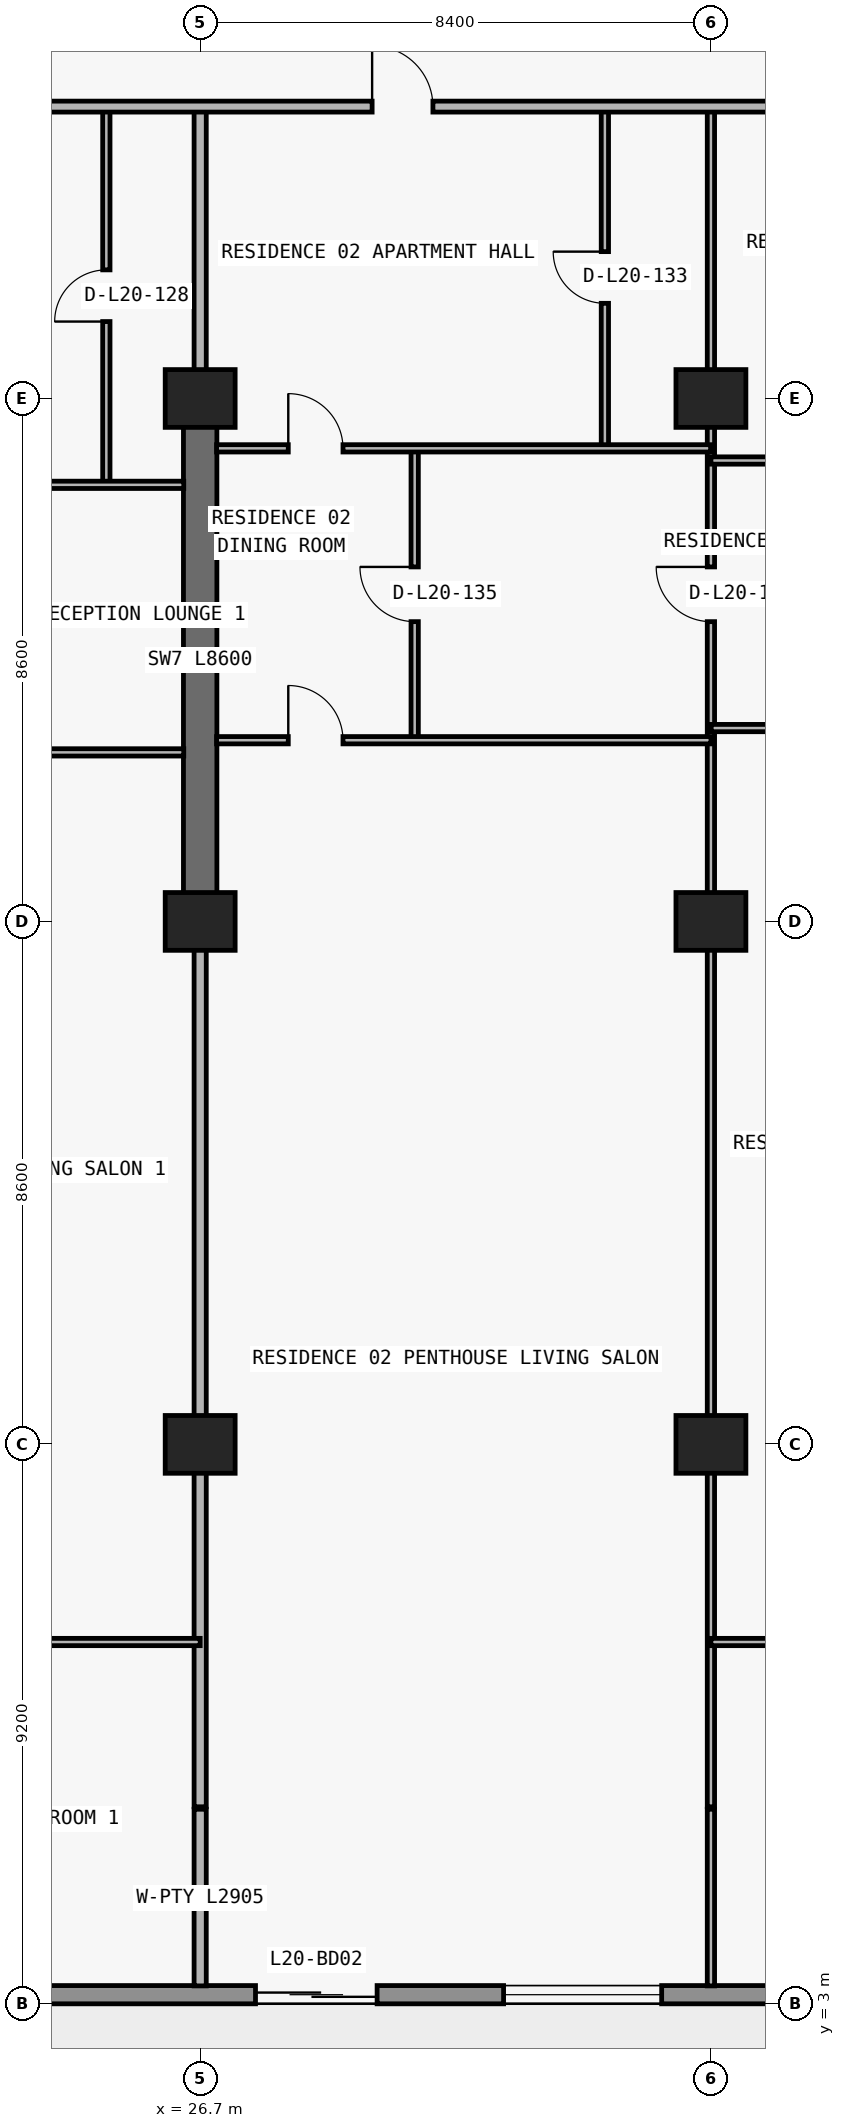
"""IFC4 building model, lengths in metres.
Left out: names, types, materials, properties, quantities, classifications, styles, units other than length and angle.
Written with IfcOpenShell. Run it as: python <this file> out.ifc"""

import sys

from ifc_helpers import new_model, si_unit, direction, frame, frame_2d, origin, origin_2d, place, context, subcontext, project, spatial, rectangle, extrude, element, fill, save


model = new_model("IFC4")
c1 = context("Model", 3, precision=1e-05, world=origin(), true_north=direction((0.0, 1.0)))
c2 = subcontext(c1, "Body", "Model", "MODEL_VIEW")
j1 = project(units=[si_unit("LENGTHUNIT", "METRE"), si_unit("PLANEANGLEUNIT", "RADIAN")], contexts=[c1])
p1 = place(None, origin())
s1 = spatial("IfcSite", under=j1, at=p1, CompositionType="ELEMENT")
p2 = place(p1, origin())
s2 = spatial("IfcBuilding", under=s1, at=p2, CompositionType="ELEMENT")
p3 = place(p2, frame((0.0, 0.0, 76.2)))
s3 = spatial("IfcBuildingStorey", under=s2, at=p3, CompositionType="ELEMENT", Elevation=76.2)
for number, where, z_axis, x_axis in (
    (1, (26.7, 12.2, 0.0), (0.0, 0.0, 1.0), (1.0, 0.0, 0.0)),
    (2, (35.1, 12.2, 0.0), (0.0, 0.0, 1.0), (1.0, 0.0, 0.0)),
    (3, (26.7, 20.8, 0.0), (0.0, 0.0, 1.0), (1.0, 0.0, 0.0)),
    (4, (35.1, 20.8, 0.0), (0.0, 0.0, 1.0), (1.0, 0.0, 0.0)),
    (5, (26.7, 29.4, 0.0), (0.0, 0.0, 1.0), (1.0, 0.0, 0.0)),
    (6, (35.1, 29.4, 0.0), (0.0, 0.0, 1.0), (1.0, 0.0, 0.0)),
):
    element("IfcColumn", number, at=place(p3, frame(where, z_axis=z_axis, x_axis=x_axis)), inside=s3, PredefinedType="COLUMN", context=c2, shape_type="SweptSolid", body=[
        extrude(rectangle(XDim=1.15, YDim=0.95, at=origin_2d()), origin(), (0.0, 0.0, 1.0), 3.0),
    ])
p4 = place(p3, frame((26.7, 20.8, 0.0), z_axis=(0.0, 0.0, 1.0), x_axis=(0.0, 1.0, 0.0)))
e7 = element("IfcWall", 7, at=p4, inside=s3, PredefinedType="SHEAR", context=c2, shape_type="SweptSolid", body=[
    extrude(rectangle(XDim=8.6, YDim=0.55, at=frame_2d((4.3, 0.0))), origin(), (0.0, 0.0, 1.0), 3.0),
])
p5 = place(p3, frame((72.7, 3.15, 0.0), z_axis=(0.0, 0.0, 1.0), x_axis=(-1.0, 0.0, 0.0)))
e8 = element("IfcWall", 8, at=p5, inside=s3, PredefinedType="STANDARD", context=c2, shape_type="SweptSolid", body=[
    extrude(rectangle(XDim=67.6, YDim=0.3, at=frame_2d((33.8, 0.0))), origin(), (0.0, 0.0, 1.0), 3.0),
])
p6 = place(p5, frame((59.89, 0.0, 0.0)))
e9 = element("IfcOpeningElement", 9, at=p6, cuts=e8, PredefinedType="OPENING", context=c2, shape_type="SweptSolid", body=[
    extrude(rectangle(XDim=2.0, YDim=2.3, at=frame_2d((1.0, 1.15))), frame((0.0, 0.16, 0.0), z_axis=(0.0, -1.0, 0.0), x_axis=(1.0, 0.0, 0.0)), (0.0, 0.0, 1.0), 0.32),
])
p7 = place(p5, frame((55.21, 0.0, 0.65)))
e10 = element("IfcOpeningElement", 10, at=p7, cuts=e8, PredefinedType="OPENING", context=c2, shape_type="SweptSolid", body=[
    extrude(rectangle(XDim=2.6, YDim=1.85, at=frame_2d((1.3, 0.925))), frame((0.0, 0.16, 0.0), z_axis=(0.0, -1.0, 0.0), x_axis=(1.0, 0.0, 0.0)), (0.0, 0.0, 1.0), 0.32),
])
p8 = place(p5, frame((49.1, 0.0, 0.85)))
e11 = element("IfcOpeningElement", 11, at=p8, cuts=e8, PredefinedType="OPENING", context=c2, shape_type="SweptSolid", body=[
    extrude(rectangle(XDim=2.2, YDim=1.55, at=frame_2d((1.1, 0.775))), frame((0.0, 0.16, 0.0), z_axis=(0.0, -1.0, 0.0), x_axis=(1.0, 0.0, 0.0)), (0.0, 0.0, 1.0), 0.32),
])
p9 = place(p5, frame((43.09, 0.0, 0.0)))
e12 = element("IfcOpeningElement", 12, at=p9, cuts=e8, PredefinedType="OPENING", context=c2, shape_type="SweptSolid", body=[
    extrude(rectangle(XDim=2.0, YDim=2.3, at=frame_2d((1.0, 1.15))), frame((0.0, 0.16, 0.0), z_axis=(0.0, -1.0, 0.0), x_axis=(1.0, 0.0, 0.0)), (0.0, 0.0, 1.0), 0.32),
])
p10 = place(p5, frame((38.41, 0.0, 0.65)))
e13 = element("IfcOpeningElement", 13, at=p10, cuts=e8, PredefinedType="OPENING", context=c2, shape_type="SweptSolid", body=[
    extrude(rectangle(XDim=2.6, YDim=1.85, at=frame_2d((1.3, 0.925))), frame((0.0, 0.16, 0.0), z_axis=(0.0, -1.0, 0.0), x_axis=(1.0, 0.0, 0.0)), (0.0, 0.0, 1.0), 0.32),
])
p11 = place(p5, frame((32.7, 0.0, 0.85)))
e14 = element("IfcOpeningElement", 14, at=p11, cuts=e8, PredefinedType="OPENING", context=c2, shape_type="SweptSolid", body=[
    extrude(rectangle(XDim=2.2, YDim=1.55, at=frame_2d((1.1, 0.775))), frame((0.0, 0.16, 0.0), z_axis=(0.0, -1.0, 0.0), x_axis=(1.0, 0.0, 0.0)), (0.0, 0.0, 1.0), 0.32),
])
p12 = place(p5, frame((24.7, 0.0, 0.85)))
e15 = element("IfcOpeningElement", 15, at=p12, cuts=e8, PredefinedType="OPENING", context=c2, shape_type="SweptSolid", body=[
    extrude(rectangle(XDim=2.2, YDim=1.55, at=frame_2d((1.1, 0.775))), frame((0.0, 0.16, 0.0), z_axis=(0.0, -1.0, 0.0), x_axis=(1.0, 0.0, 0.0)), (0.0, 0.0, 1.0), 0.32),
])
p13 = place(p5, frame((18.69, 0.0, 0.0)))
e16 = element("IfcOpeningElement", 16, at=p13, cuts=e8, PredefinedType="OPENING", context=c2, shape_type="SweptSolid", body=[
    extrude(rectangle(XDim=2.0, YDim=2.3, at=frame_2d((1.0, 1.15))), frame((0.0, 0.16, 0.0), z_axis=(0.0, -1.0, 0.0), x_axis=(1.0, 0.0, 0.0)), (0.0, 0.0, 1.0), 0.32),
])
p14 = place(p5, frame((14.01, 0.0, 0.65)))
e17 = element("IfcOpeningElement", 17, at=p14, cuts=e8, PredefinedType="OPENING", context=c2, shape_type="SweptSolid", body=[
    extrude(rectangle(XDim=2.6, YDim=1.85, at=frame_2d((1.3, 0.925))), frame((0.0, 0.16, 0.0), z_axis=(0.0, -1.0, 0.0), x_axis=(1.0, 0.0, 0.0)), (0.0, 0.0, 1.0), 0.32),
])
p15 = place(p5, frame((7.9, 0.0, 0.85)))
e18 = element("IfcOpeningElement", 18, at=p15, cuts=e8, PredefinedType="OPENING", context=c2, shape_type="SweptSolid", body=[
    extrude(rectangle(XDim=2.2, YDim=1.55, at=frame_2d((1.1, 0.775))), frame((0.0, 0.16, 0.0), z_axis=(0.0, -1.0, 0.0), x_axis=(1.0, 0.0, 0.0)), (0.0, 0.0, 1.0), 0.32),
])
p16 = place(p3, frame((25.157, 27.98, 0.0), z_axis=(0.0, 0.0, 1.0), x_axis=(0.0, 1.0, 0.0)))
e19 = element("IfcWall", 19, at=p16, inside=s3, PredefinedType="PARTITIONING", context=c2, shape_type="SweptSolid", body=[
    extrude(rectangle(XDim=6.22, YDim=0.12, at=frame_2d((3.11, 0.0))), origin(), (0.0, 0.0, 1.0), 3.0),
])
p17 = place(p16, frame((2.685, 0.0, 0.0)))
e20 = element("IfcOpeningElement", 20, at=p17, cuts=e19, PredefinedType="OPENING", context=c2, shape_type="SweptSolid", body=[
    extrude(rectangle(XDim=0.85, YDim=2.1, at=frame_2d((0.425, 1.05))), frame((0.0, 0.07, 0.0), z_axis=(0.0, -1.0, 0.0), x_axis=(1.0, 0.0, 0.0)), (0.0, 0.0, 1.0), 0.14),
])
p18 = place(p3, frame((26.7, 3.295, 0.0), z_axis=(0.0, 0.0, 1.0), x_axis=(0.0, 1.0, 0.0)))
e21 = element("IfcWall", 21, at=p18, inside=s3, PredefinedType="PARTITIONING", context=c2, shape_type="SweptSolid", body=[
    extrude(rectangle(XDim=2.905, YDim=0.2, at=frame_2d((1.453, 0.0))), origin(), (0.0, 0.0, 1.0), 3.0),
])
p19 = place(p3, frame((26.7, 6.24, 0.0), z_axis=(0.0, 0.0, 1.0), x_axis=(0.0, 1.0, 0.0)))
e22 = element("IfcWall", 22, at=p19, inside=s3, PredefinedType="PARTITIONING", context=c2, shape_type="SweptSolid", body=[
    extrude(rectangle(XDim=14.555, YDim=0.2, at=frame_2d((7.277, 0.0))), origin(), (0.0, 0.0, 1.0), 2.06),
])
p20 = place(p3, frame((26.7, 29.405, 0.0), z_axis=(0.0, 0.0, 1.0), x_axis=(0.0, 1.0, 0.0)))
e23 = element("IfcWall", 23, at=p20, inside=s3, PredefinedType="PARTITIONING", context=c2, shape_type="SweptSolid", body=[
    extrude(rectangle(XDim=4.795, YDim=0.2, at=frame_2d((2.397, 0.0))), origin(), (0.0, 0.0, 1.0), 2.285),
])
p21 = place(p3, frame((30.228, 23.78, 0.0), z_axis=(0.0, 0.0, 1.0), x_axis=(0.0, 1.0, 0.0)))
e24 = element("IfcWall", 24, at=p21, inside=s3, PredefinedType="PARTITIONING", context=c2, shape_type="SweptSolid", body=[
    extrude(rectangle(XDim=4.8, YDim=0.12, at=frame_2d((2.4, 0.0))), origin(), (0.0, 0.0, 1.0), 3.0),
])
p22 = place(p21, frame((1.95, 0.0, 0.0)))
e25 = element("IfcOpeningElement", 25, at=p22, cuts=e24, PredefinedType="OPENING", context=c2, shape_type="SweptSolid", body=[
    extrude(rectangle(XDim=0.9, YDim=2.15, at=frame_2d((0.45, 1.075))), frame((0.0, 0.07, 0.0), z_axis=(0.0, -1.0, 0.0), x_axis=(1.0, 0.0, 0.0)), (0.0, 0.0, 1.0), 0.14),
])
p23 = place(p3, frame((33.356, 28.58, 0.0), z_axis=(0.0, 0.0, 1.0), x_axis=(0.0, 1.0, 0.0)))
e26 = element("IfcWall", 26, at=p23, inside=s3, PredefinedType="PARTITIONING", context=c2, shape_type="SweptSolid", body=[
    extrude(rectangle(XDim=5.62, YDim=0.12, at=frame_2d((2.81, 0.0))), origin(), (0.0, 0.0, 1.0), 3.0),
])
p24 = place(p23, frame((2.385, 0.0, 0.0)))
e27 = element("IfcOpeningElement", 27, at=p24, cuts=e26, PredefinedType="OPENING", context=c2, shape_type="SweptSolid", body=[
    extrude(rectangle(XDim=0.85, YDim=2.1, at=frame_2d((0.425, 1.05))), frame((0.0, 0.07, 0.0), z_axis=(0.0, -1.0, 0.0), x_axis=(1.0, 0.0, 0.0)), (0.0, 0.0, 1.0), 0.14),
])
p25 = place(p3, frame((35.1, 3.295, 0.0), z_axis=(0.0, 0.0, 1.0), x_axis=(0.0, 1.0, 0.0)))
e28 = element("IfcWall", 28, at=p25, inside=s3, PredefinedType="PARTITIONING", context=c2, shape_type="SweptSolid", body=[
    extrude(rectangle(XDim=2.905, YDim=0.12, at=frame_2d((1.453, 0.0))), origin(), (0.0, 0.0, 1.0), 3.0),
])
p26 = place(p3, frame((35.1, 6.24, 0.0), z_axis=(0.0, 0.0, 1.0), x_axis=(0.0, 1.0, 0.0)))
e29 = element("IfcWall", 29, at=p26, inside=s3, PredefinedType="PARTITIONING", context=c2, shape_type="SweptSolid", body=[
    extrude(rectangle(XDim=27.96, YDim=0.12, at=frame_2d((13.98, 0.0))), origin(), (0.0, 0.0, 1.0), 2.06),
])
p27 = place(p26, frame((19.49, 0.0, 0.0)))
e30 = element("IfcOpeningElement", 30, at=p27, cuts=e29, PredefinedType="OPENING", context=c2, shape_type="SweptSolid", body=[
    extrude(rectangle(XDim=0.9, YDim=2.01, at=frame_2d((0.45, 1.005))), frame((0.0, 0.07, 0.0), z_axis=(0.0, -1.0, 0.0), x_axis=(1.0, 0.0, 0.0)), (0.0, 0.0, 1.0), 0.14),
])
p28 = place(p3, frame((18.3, 8.95, 0.0), z_axis=(0.0, 0.0, 1.0), x_axis=(1.0, 0.0, 0.0)))
e31 = element("IfcWall", 31, at=p28, inside=s3, PredefinedType="PARTITIONING", context=c2, shape_type="SweptSolid", body=[
    extrude(rectangle(XDim=8.4, YDim=0.12, at=frame_2d((4.2, 0.0))), origin(), (0.0, 0.0, 1.0), 3.0),
])
p29 = place(p28, frame((3.75, 0.0, 0.0)))
e32 = element("IfcOpeningElement", 32, at=p29, cuts=e31, PredefinedType="OPENING", context=c2, shape_type="SweptSolid", body=[
    extrude(rectangle(XDim=0.9, YDim=2.15, at=frame_2d((0.45, 1.075))), frame((0.0, 0.07, 0.0), z_axis=(0.0, -1.0, 0.0), x_axis=(1.0, 0.0, 0.0)), (0.0, 0.0, 1.0), 0.14),
])
p30 = place(p3, frame((35.1, 8.95, 0.0), z_axis=(0.0, 0.0, 1.0), x_axis=(1.0, 0.0, 0.0)))
e33 = element("IfcWall", 33, at=p30, inside=s3, PredefinedType="PARTITIONING", context=c2, shape_type="SweptSolid", body=[
    extrude(rectangle(XDim=16.0, YDim=0.12, at=frame_2d((8.0, 0.0))), origin(), (0.0, 0.0, 1.0), 3.0),
])
p31 = place(p30, frame((3.35, 0.0, 0.0)))
e34 = element("IfcOpeningElement", 34, at=p31, cuts=e33, PredefinedType="OPENING", context=c2, shape_type="SweptSolid", body=[
    extrude(rectangle(XDim=0.9, YDim=2.15, at=frame_2d((0.45, 1.075))), frame((0.0, 0.07, 0.0), z_axis=(0.0, -1.0, 0.0), x_axis=(1.0, 0.0, 0.0)), (0.0, 0.0, 1.0), 0.14),
])
p32 = place(p30, frame((11.35, 0.0, 0.0)))
e35 = element("IfcOpeningElement", 35, at=p32, cuts=e33, PredefinedType="OPENING", context=c2, shape_type="SweptSolid", body=[
    extrude(rectangle(XDim=0.9, YDim=2.15, at=frame_2d((0.45, 1.075))), frame((0.0, 0.07, 0.0), z_axis=(0.0, -1.0, 0.0), x_axis=(1.0, 0.0, 0.0)), (0.0, 0.0, 1.0), 0.14),
])
p33 = place(p3, frame((18.305, 23.58, 0.0), z_axis=(0.0, 0.0, 1.0), x_axis=(1.0, 0.0, 0.0)))
e36 = element("IfcWall", 36, at=p33, inside=s3, PredefinedType="PARTITIONING", context=c2, shape_type="SweptSolid", body=[
    extrude(rectangle(XDim=8.125, YDim=0.12, at=frame_2d((4.062, 0.0))), origin(), (0.0, 0.0, 1.0), 3.0),
])
p34 = place(p33, frame((3.613, 0.0, 0.0)))
e37 = element("IfcOpeningElement", 37, at=p34, cuts=e36, PredefinedType="OPENING", context=c2, shape_type="SweptSolid", body=[
    extrude(rectangle(XDim=0.9, YDim=2.15, at=frame_2d((0.45, 1.075))), frame((0.0, 0.07, 0.0), z_axis=(0.0, -1.0, 0.0), x_axis=(1.0, 0.0, 0.0)), (0.0, 0.0, 1.0), 0.14),
])
p35 = place(p3, frame((26.97, 23.78, 0.0), z_axis=(0.0, 0.0, 1.0), x_axis=(1.0, 0.0, 0.0)))
e38 = element("IfcWall", 38, at=p35, inside=s3, PredefinedType="PARTITIONING", context=c2, shape_type="SweptSolid", body=[
    extrude(rectangle(XDim=8.13, YDim=0.12, at=frame_2d((4.065, 0.0))), origin(), (0.0, 0.0, 1.0), 3.0),
])
p36 = place(p35, frame((1.179, 0.0, 0.0)))
e39 = element("IfcOpeningElement", 39, at=p36, cuts=e38, PredefinedType="OPENING", context=c2, shape_type="SweptSolid", body=[
    extrude(rectangle(XDim=0.9, YDim=2.15, at=frame_2d((0.45, 1.075))), frame((0.0, 0.07, 0.0), z_axis=(0.0, -1.0, 0.0), x_axis=(1.0, 0.0, 0.0)), (0.0, 0.0, 1.0), 0.14),
])
p37 = place(p3, frame((35.105, 23.98, 0.0), z_axis=(0.0, 0.0, 1.0), x_axis=(1.0, 0.0, 0.0)))
e40 = element("IfcWall", 40, at=p37, inside=s3, PredefinedType="PARTITIONING", context=c2, shape_type="SweptSolid", body=[
    extrude(rectangle(XDim=7.59, YDim=0.12, at=frame_2d((3.795, 0.0))), origin(), (0.0, 0.0, 1.0), 3.0),
])
p38 = place(p37, frame((3.345, 0.0, 0.0)))
e41 = element("IfcOpeningElement", 41, at=p38, cuts=e40, PredefinedType="OPENING", context=c2, shape_type="SweptSolid", body=[
    extrude(rectangle(XDim=0.9, YDim=2.15, at=frame_2d((0.45, 1.075))), frame((0.0, 0.07, 0.0), z_axis=(0.0, -1.0, 0.0), x_axis=(1.0, 0.0, 0.0)), (0.0, 0.0, 1.0), 0.14),
])
p39 = place(p3, frame((18.3, 27.98, 0.0), z_axis=(0.0, 0.0, 1.0), x_axis=(1.0, 0.0, 0.0)))
e42 = element("IfcWall", 42, at=p39, inside=s3, PredefinedType="PARTITIONING", context=c2, shape_type="SweptSolid", body=[
    extrude(rectangle(XDim=8.13, YDim=0.12, at=frame_2d((4.065, 0.0))), origin(), (0.0, 0.0, 1.0), 3.0),
])
p40 = place(p39, frame((2.979, 0.0, 0.0)))
e43 = element("IfcOpeningElement", 43, at=p40, cuts=e42, PredefinedType="OPENING", context=c2, shape_type="SweptSolid", body=[
    extrude(rectangle(XDim=0.9, YDim=2.15, at=frame_2d((0.45, 1.075))), frame((0.0, 0.07, 0.0), z_axis=(0.0, -1.0, 0.0), x_axis=(1.0, 0.0, 0.0)), (0.0, 0.0, 1.0), 0.14),
])
p41 = place(p3, frame((35.1, 28.38, 0.0), z_axis=(0.0, 0.0, 1.0), x_axis=(1.0, 0.0, 0.0)))
e44 = element("IfcWall", 44, at=p41, inside=s3, PredefinedType="PARTITIONING", context=c2, shape_type="SweptSolid", body=[
    extrude(rectangle(XDim=7.6, YDim=0.12, at=frame_2d((3.8, 0.0))), origin(), (0.0, 0.0, 1.0), 3.0),
])
p42 = place(p41, frame((2.482, 0.0, 0.0)))
e45 = element("IfcOpeningElement", 45, at=p42, cuts=e44, PredefinedType="OPENING", context=c2, shape_type="SweptSolid", body=[
    extrude(rectangle(XDim=0.9, YDim=2.15, at=frame_2d((0.45, 1.075))), frame((0.0, 0.07, 0.0), z_axis=(0.0, -1.0, 0.0), x_axis=(1.0, 0.0, 0.0)), (0.0, 0.0, 1.0), 0.14),
])
p43 = place(p3, frame((26.97, 28.58, 0.0), z_axis=(0.0, 0.0, 1.0), x_axis=(1.0, 0.0, 0.0)))
e46 = element("IfcWall", 46, at=p43, inside=s3, PredefinedType="PARTITIONING", context=c2, shape_type="SweptSolid", body=[
    extrude(rectangle(XDim=8.125, YDim=0.12, at=frame_2d((4.062, 0.0))), origin(), (0.0, 0.0, 1.0), 3.0),
])
p44 = place(p43, frame((1.179, 0.0, 0.0)))
e47 = element("IfcOpeningElement", 47, at=p44, cuts=e46, PredefinedType="OPENING", context=c2, shape_type="SweptSolid", body=[
    extrude(rectangle(XDim=0.9, YDim=2.15, at=frame_2d((0.45, 1.075))), frame((0.0, 0.07, 0.0), z_axis=(0.0, -1.0, 0.0), x_axis=(1.0, 0.0, 0.0)), (0.0, 0.0, 1.0), 0.14),
])
p45 = place(p3, frame((5.105, 34.2, 0.0), z_axis=(0.0, 0.0, 1.0), x_axis=(1.0, 0.0, 0.0)))
e48 = element("IfcWall", 48, at=p45, inside=s3, PredefinedType="PARTITIONING", context=c2, shape_type="SweptSolid", body=[
    extrude(rectangle(XDim=67.595, YDim=0.18, at=frame_2d((33.797, 0.0))), origin(), (0.0, 0.0, 1.0), 3.0),
])
p46 = place(p45, frame((7.639, 0.0, 0.0)))
e49 = element("IfcOpeningElement", 49, at=p46, cuts=e48, PredefinedType="OPENING", context=c2, shape_type="SweptSolid", body=[
    extrude(rectangle(XDim=1.0, YDim=2.2, at=frame_2d((0.5, 1.1))), frame((0.0, 0.1, 0.0), z_axis=(0.0, -1.0, 0.0), x_axis=(1.0, 0.0, 0.0)), (0.0, 0.0, 1.0), 0.2),
])
p47 = place(p45, frame((24.423, 0.0, 0.0)))
e50 = element("IfcOpeningElement", 50, at=p47, cuts=e48, PredefinedType="OPENING", context=c2, shape_type="SweptSolid", body=[
    extrude(rectangle(XDim=1.0, YDim=2.2, at=frame_2d((0.5, 1.1))), frame((0.0, 0.1, 0.0), z_axis=(0.0, -1.0, 0.0), x_axis=(1.0, 0.0, 0.0)), (0.0, 0.0, 1.0), 0.2),
])
p48 = place(p45, frame((48.825, 0.0, 0.0)))
e51 = element("IfcOpeningElement", 51, at=p48, cuts=e48, PredefinedType="OPENING", context=c2, shape_type="SweptSolid", body=[
    extrude(rectangle(XDim=1.0, YDim=2.2, at=frame_2d((0.5, 1.1))), frame((0.0, 0.1, 0.0), z_axis=(0.0, -1.0, 0.0), x_axis=(1.0, 0.0, 0.0)), (0.0, 0.0, 1.0), 0.2),
])
p49 = place(p9, origin())
e52 = element("IfcDoor", 52, at=p49, inside=s3, OperationType="DOUBLE_DOOR_SLIDING", PredefinedType="DOOR", context=c2, shape_type="SweptSolid", body=[
    extrude(rectangle(XDim=2.0, YDim=2.3, at=frame_2d((1.0, 1.15))), frame((0.0, 0.025, 0.0), z_axis=(0.0, -1.0, 0.0), x_axis=(1.0, 0.0, 0.0)), (0.0, 0.0, 1.0), 0.05),
])
fill(e12, e52)
p50 = place(p10, origin())
e53 = element("IfcWindow", 53, at=p50, inside=s3, PartitioningType="SINGLE_PANEL", PredefinedType="WINDOW", context=c2, shape_type="SweptSolid", body=[
    extrude(rectangle(XDim=2.6, YDim=1.85, at=frame_2d((1.3, 0.925))), frame((0.0, 0.03, 0.0), z_axis=(0.0, -1.0, 0.0), x_axis=(1.0, 0.0, 0.0)), (0.0, 0.0, 1.0), 0.06),
])
fill(e13, e53)
p51 = place(p17, origin())
e54 = element("IfcDoor", 54, at=p51, inside=s3, OperationType="SINGLE_SWING_LEFT", PredefinedType="DOOR", context=c2, shape_type="SweptSolid", body=[
    extrude(rectangle(XDim=0.85, YDim=2.1, at=frame_2d((0.425, 1.05))), frame((0.0, 0.025, 0.0), z_axis=(0.0, -1.0, 0.0), x_axis=(1.0, 0.0, 0.0)), (0.0, 0.0, 1.0), 0.05),
])
fill(e20, e54)
p52 = place(p47, origin())
e55 = element("IfcDoor", 55, at=p52, inside=s3, OperationType="SINGLE_SWING_LEFT", PredefinedType="DOOR", context=c2, shape_type="SweptSolid", body=[
    extrude(rectangle(XDim=1.0, YDim=2.2, at=frame_2d((0.5, 1.1))), frame((0.0, 0.025, 0.0), z_axis=(0.0, -1.0, 0.0), x_axis=(1.0, 0.0, 0.0)), (0.0, 0.0, 1.0), 0.05),
])
fill(e50, e55)
p53 = place(p24, origin())
e56 = element("IfcDoor", 56, at=p53, inside=s3, OperationType="SINGLE_SWING_RIGHT", PredefinedType="DOOR", context=c2, shape_type="SweptSolid", body=[
    extrude(rectangle(XDim=0.85, YDim=2.1, at=frame_2d((0.425, 1.05))), frame((0.0, 0.025, 0.0), z_axis=(0.0, -1.0, 0.0), x_axis=(1.0, 0.0, 0.0)), (0.0, 0.0, 1.0), 0.05),
])
fill(e27, e56)
p54 = place(p44, origin())
e57 = element("IfcDoor", 57, at=p54, inside=s3, OperationType="SINGLE_SWING_LEFT", PredefinedType="DOOR", context=c2, shape_type="SweptSolid", body=[
    extrude(rectangle(XDim=0.9, YDim=2.15, at=frame_2d((0.45, 1.075))), frame((0.0, 0.025, 0.0), z_axis=(0.0, -1.0, 0.0), x_axis=(1.0, 0.0, 0.0)), (0.0, 0.0, 1.0), 0.05),
])
fill(e47, e57)
p55 = place(p22, origin())
e58 = element("IfcDoor", 58, at=p55, inside=s3, OperationType="SINGLE_SWING_RIGHT", PredefinedType="DOOR", context=c2, shape_type="SweptSolid", body=[
    extrude(rectangle(XDim=0.9, YDim=2.15, at=frame_2d((0.45, 1.075))), frame((0.0, 0.025, 0.0), z_axis=(0.0, -1.0, 0.0), x_axis=(1.0, 0.0, 0.0)), (0.0, 0.0, 1.0), 0.05),
])
fill(e25, e58)
p56 = place(p36, origin())
e59 = element("IfcDoor", 59, at=p56, inside=s3, OperationType="SINGLE_SWING_LEFT", PredefinedType="DOOR", context=c2, shape_type="SweptSolid", body=[
    extrude(rectangle(XDim=0.9, YDim=2.15, at=frame_2d((0.45, 1.075))), frame((0.0, 0.025, 0.0), z_axis=(0.0, -1.0, 0.0), x_axis=(1.0, 0.0, 0.0)), (0.0, 0.0, 1.0), 0.05),
])
fill(e39, e59)
p57 = place(p27, origin())
e60 = element("IfcDoor", 60, at=p57, inside=s3, OperationType="SINGLE_SWING_RIGHT", PredefinedType="DOOR", context=c2, shape_type="SweptSolid", body=[
    extrude(rectangle(XDim=0.9, YDim=2.01, at=frame_2d((0.45, 1.005))), frame((0.0, 0.025, 0.0), z_axis=(0.0, -1.0, 0.0), x_axis=(1.0, 0.0, 0.0)), (0.0, 0.0, 1.0), 0.05),
])
fill(e30, e60)
save(model, sys.argv[1])
